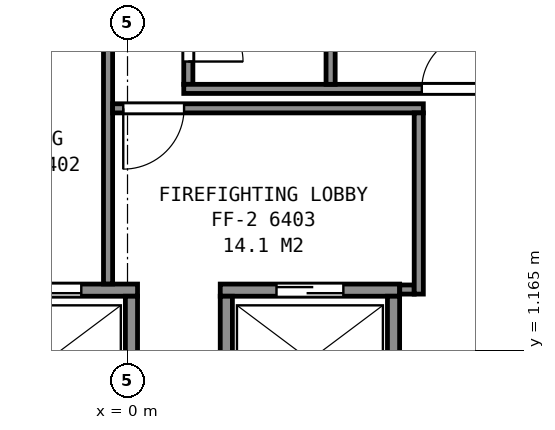
"""IFC4 building model, lengths in metres.
Left out: names, types, materials, properties, quantities, classifications, styles, units other than length and angle.
Written with IfcOpenShell. Run it as: python <this file> out.ifc"""

import sys

from ifc_helpers import new_model, si_unit, direction, frame, frame_2d, origin, place, context, subcontext, project, spatial, rectangle, extrude, element, fill, save


model = new_model("IFC4")
c1 = context("Model", 3, precision=1e-05, world=origin(), true_north=direction((0.0, 1.0)))
c2 = subcontext(c1, "Body", "Model", "MODEL_VIEW")
j1 = project(units=[si_unit("LENGTHUNIT", "METRE"), si_unit("PLANEANGLEUNIT", "RADIAN")], contexts=[c1])
p1 = place(None, origin())
s1 = spatial("IfcSite", under=j1, at=p1, CompositionType="ELEMENT")
p2 = place(p1, origin())
s2 = spatial("IfcBuilding", under=s1, at=p2, CompositionType="ELEMENT")
p3 = place(p2, frame((0.0, 0.0, 254.5)))
s3 = spatial("IfcBuildingStorey", under=s2, at=p3, CompositionType="ELEMENT", Elevation=254.5)
p4 = place(p3, frame((-2.785, 2.15, 0.0), z_axis=(0.0, 0.0, 1.0), x_axis=(1.0, 0.0, 0.0)))
e1 = element("IfcWall", 1, at=p4, inside=s3, PredefinedType="PARTITIONING", context=c2, shape_type="SweptSolid", body=[
    extrude(rectangle(XDim=2.95, YDim=0.2, at=frame_2d((1.475, 0.0))), origin(), (0.0, 0.0, 1.0), 3.7),
])
p5 = place(p4, frame((0.925, 0.0, 0.0)))
e2 = element("IfcOpeningElement", 2, at=p5, cuts=e1, PredefinedType="OPENING", context=c2, shape_type="SweptSolid", body=[
    extrude(rectangle(XDim=1.1, YDim=2.1, at=frame_2d((0.55, 1.05))), frame((0.0, 0.11, 0.0), z_axis=(0.0, -1.0, 0.0), x_axis=(1.0, 0.0, 0.0)), (0.0, 0.0, 1.0), 0.22),
])
p6 = place(p3, frame((1.525, 2.15, 0.0), z_axis=(0.0, 0.0, 1.0), x_axis=(1.0, 0.0, 0.0)))
e3 = element("IfcWall", 3, at=p6, inside=s3, PredefinedType="PARTITIONING", context=c2, shape_type="SweptSolid", body=[
    extrude(rectangle(XDim=2.95, YDim=0.2, at=frame_2d((1.475, 0.0))), origin(), (0.0, 0.0, 1.0), 3.7),
])
p7 = place(p6, frame((0.925, 0.0, 0.0)))
e4 = element("IfcOpeningElement", 4, at=p7, cuts=e3, PredefinedType="OPENING", context=c2, shape_type="SweptSolid", body=[
    extrude(rectangle(XDim=1.1, YDim=2.1, at=frame_2d((0.55, 1.05))), frame((0.0, 0.11, 0.0), z_axis=(0.0, -1.0, 0.0), x_axis=(1.0, 0.0, 0.0)), (0.0, 0.0, 1.0), 0.22),
])
p8 = place(p3, frame((5.663, -1.612, 0.0), z_axis=(0.0, 0.0, 1.0), x_axis=(0.49998122708, 0.866036242063, 0.0)))
e5 = element("IfcWall", 5, at=p8, inside=s3, PredefinedType="PARTITIONING", context=c2, shape_type="SweptSolid", body=[
    extrude(rectangle(XDim=4.9, YDim=0.2, at=frame_2d((2.45, 0.0))), origin(), (0.0, 0.0, 1.0), 3.7),
])
for number, where, z_axis, x_axis in (
    (6, (4.375, 0.1, 0.0), (0.0, 0.0, 1.0), (0.0, 1.0, 0.0)),
    (7, (1.625, 0.1, 0.0), (0.0, 0.0, 1.0), (0.0, 1.0, 0.0)),
    (8, (0.065, 0.1, 0.0), (0.0, 0.0, 1.0), (0.0, 1.0, 0.0)),
):
    element("IfcWall", number, at=place(p3, frame(where, z_axis=z_axis, x_axis=x_axis)), inside=s3, PredefinedType="PARTITIONING", context=c2, shape_type="SweptSolid", body=[
        extrude(rectangle(XDim=1.95, YDim=0.2, at=frame_2d((0.975, 0.0))), origin(), (0.0, 0.0, 1.0), 3.7),
    ])
p9 = place(p3, frame((-0.32, 2.252, 0.0), z_axis=(0.0, 0.0, 1.0), x_axis=(0.0, 1.0, 0.0)))
e9 = element("IfcWall", 9, at=p9, inside=s3, PredefinedType="PARTITIONING", context=c2, shape_type="SweptSolid", body=[
    extrude(rectangle(XDim=4.063, YDim=0.15, at=frame_2d((2.031, 0.0))), origin(), (0.0, 0.0, 1.0), 3.45),
])
p10 = place(p3, frame((-0.245, 5.14, 0.0), z_axis=(0.0, 0.0, 1.0), x_axis=(1.0, 0.0, 0.0)))
e10 = element("IfcWall", 10, at=p10, inside=s3, PredefinedType="PARTITIONING", context=c2, shape_type="SweptSolid", body=[
    extrude(rectangle(XDim=5.11, YDim=0.15, at=frame_2d((2.555, 0.0))), origin(), (0.0, 0.0, 1.0), 3.45),
])
p11 = place(p10, frame((0.175, 0.0, 0.0)))
e11 = element("IfcOpeningElement", 11, at=p11, cuts=e10, PredefinedType="OPENING", context=c2, shape_type="SweptSolid", body=[
    extrude(rectangle(XDim=1.0, YDim=2.1, at=frame_2d((0.5, 1.05))), frame((0.0, 0.085, 0.0), z_axis=(0.0, -1.0, 0.0), x_axis=(1.0, 0.0, 0.0)), (0.0, 0.0, 1.0), 0.17),
])
p12 = place(p3, frame((1.0, 7.56, 0.0), z_axis=(0.0, 0.0, 1.0), x_axis=(0.0, -1.0, 0.0)))
e12 = element("IfcWall", 12, at=p12, inside=s3, PredefinedType="PARTITIONING", context=c2, shape_type="SweptSolid", body=[
    extrude(rectangle(XDim=2.025, YDim=0.15, at=frame_2d((1.013, 0.0))), origin(), (0.0, 0.0, 1.0), 3.45),
])
p13 = place(p12, frame((0.75, 0.0, 0.0)))
e13 = element("IfcOpeningElement", 13, at=p13, cuts=e12, PredefinedType="OPENING", context=c2, shape_type="SweptSolid", body=[
    extrude(rectangle(XDim=0.9, YDim=2.1, at=frame_2d((0.45, 1.05))), frame((0.0, 0.085, 0.0), z_axis=(0.0, -1.0, 0.0), x_axis=(1.0, 0.0, 0.0)), (0.0, 0.0, 1.0), 0.17),
])
p14 = place(p3, frame((0.925, 5.46, 0.0), z_axis=(0.0, 0.0, 1.0), x_axis=(1.0, 0.0, 0.0)))
e14 = element("IfcWall", 14, at=p14, inside=s3, PredefinedType="PARTITIONING", context=c2, shape_type="SweptSolid", body=[
    extrude(rectangle(XDim=5.22, YDim=0.15, at=frame_2d((2.61, 0.0))), origin(), (0.0, 0.0, 1.0), 3.45),
])
p15 = place(p14, frame((3.915, 0.0, 0.0)))
e15 = element("IfcOpeningElement", 15, at=p15, cuts=e14, PredefinedType="OPENING", context=c2, shape_type="SweptSolid", body=[
    extrude(rectangle(XDim=0.9, YDim=2.1, at=frame_2d((0.45, 1.05))), frame((0.0, 0.085, 0.0), z_axis=(0.0, -1.0, 0.0), x_axis=(1.0, 0.0, 0.0)), (0.0, 0.0, 1.0), 0.17),
])
p16 = place(p3, frame((3.34, 5.535, 0.0), z_axis=(0.0, 0.0, 1.0), x_axis=(0.0, 1.0, 0.0)))
e16 = element("IfcWall", 16, at=p16, inside=s3, PredefinedType="PARTITIONING", context=c2, shape_type="SweptSolid", body=[
    extrude(rectangle(XDim=2.025, YDim=0.15, at=frame_2d((1.013, 0.0))), origin(), (0.0, 0.0, 1.0), 3.45),
])
p17 = place(p3, frame((4.477, 2.16, 0.0), z_axis=(0.0, 0.0, 1.0), x_axis=(1.0, 0.0, 0.0)))
e17 = element("IfcWall", 17, at=p17, inside=s3, PredefinedType="PARTITIONING", context=c2, shape_type="SweptSolid", body=[
    extrude(rectangle(XDim=0.238, YDim=0.15, at=frame_2d((0.119, 0.0))), origin(), (0.0, 0.0, 1.0), 3.45),
])
p18 = place(p3, frame((4.79, 2.085, 0.0), z_axis=(0.0, 0.0, 1.0), x_axis=(0.0, 1.0, 0.0)))
e18 = element("IfcWall", 18, at=p18, inside=s3, PredefinedType="PARTITIONING", context=c2, shape_type="SweptSolid", body=[
    extrude(rectangle(XDim=2.98, YDim=0.15, at=frame_2d((1.49, 0.0))), origin(), (0.0, 0.0, 1.0), 3.45),
])
p19 = place(p3, frame((13.342, 2.306, 0.0), z_axis=(0.0, 0.0, 1.0), x_axis=(-0.499983003136, -0.866035216706, 0.0)))
e19 = element("IfcWall", 19, at=p19, inside=s3, PredefinedType="PARTITIONING", context=c2, shape_type="SweptSolid", body=[
    extrude(rectangle(XDim=17.385, YDim=0.2, at=frame_2d((8.692, 0.0))), origin(), (0.0, 0.0, 1.0), 2.362),
])
p20 = place(p19, frame((15.185, 0.0, 0.0)))
e20 = element("IfcOpeningElement", 20, at=p20, cuts=e19, PredefinedType="OPENING", context=c2, shape_type="SweptSolid", body=[
    extrude(rectangle(XDim=0.9, YDim=2.1, at=frame_2d((0.45, 1.05))), frame((0.0, 0.11, 0.0), z_axis=(0.0, -1.0, 0.0), x_axis=(1.0, 0.0, 0.0)), (0.0, 0.0, 1.0), 0.22),
])
p21 = place(p19, frame((12.094, 0.0, 0.0)))
e21 = element("IfcOpeningElement", 21, at=p21, cuts=e19, PredefinedType="OPENING", context=c2, shape_type="SweptSolid", body=[
    extrude(rectangle(XDim=0.9, YDim=2.1, at=frame_2d((0.45, 1.05))), frame((0.0, 0.11, 0.0), z_axis=(0.0, -1.0, 0.0), x_axis=(1.0, 0.0, 0.0)), (0.0, 0.0, 1.0), 0.22),
])
p22 = place(p19, frame((5.867, 0.0, 0.0)))
e22 = element("IfcOpeningElement", 22, at=p22, cuts=e19, PredefinedType="OPENING", context=c2, shape_type="SweptSolid", body=[
    extrude(rectangle(XDim=0.9, YDim=2.1, at=frame_2d((0.45, 1.05))), frame((0.0, 0.11, 0.0), z_axis=(0.0, -1.0, 0.0), x_axis=(1.0, 0.0, 0.0)), (0.0, 0.0, 1.0), 0.22),
])
p23 = place(p19, frame((1.392, 0.0, 0.0)))
e23 = element("IfcOpeningElement", 23, at=p23, cuts=e19, PredefinedType="OPENING", context=c2, shape_type="SweptSolid", body=[
    extrude(rectangle(XDim=0.9, YDim=2.1, at=frame_2d((0.45, 1.05))), frame((0.0, 0.11, 0.0), z_axis=(0.0, -1.0, 0.0), x_axis=(1.0, 0.0, 0.0)), (0.0, 0.0, 1.0), 0.22),
])
p24 = place(p5, origin())
e24 = element("IfcDoor", 24, at=p24, inside=s3, OperationType="SLIDING_TO_LEFT", PredefinedType="DOOR", context=c2, shape_type="SweptSolid", body=[
    extrude(rectangle(XDim=1.1, YDim=2.1, at=frame_2d((0.55, 1.05))), frame((0.0, 0.025, 0.0), z_axis=(0.0, -1.0, 0.0), x_axis=(1.0, 0.0, 0.0)), (0.0, 0.0, 1.0), 0.05),
])
fill(e2, e24)
p25 = place(p7, origin())
e25 = element("IfcDoor", 25, at=p25, inside=s3, OperationType="SLIDING_TO_RIGHT", PredefinedType="DOOR", context=c2, shape_type="SweptSolid", body=[
    extrude(rectangle(XDim=1.1, YDim=2.1, at=frame_2d((0.55, 1.05))), frame((0.0, 0.025, 0.0), z_axis=(0.0, -1.0, 0.0), x_axis=(1.0, 0.0, 0.0)), (0.0, 0.0, 1.0), 0.05),
])
fill(e4, e25)
p26 = place(p11, origin())
e26 = element("IfcDoor", 26, at=p26, inside=s3, OperationType="SINGLE_SWING_LEFT", PredefinedType="DOOR", context=c2, shape_type="SweptSolid", body=[
    extrude(rectangle(XDim=1.0, YDim=2.1, at=frame_2d((0.5, 1.05))), frame((0.0, 0.025, 0.0), z_axis=(0.0, -1.0, 0.0), x_axis=(1.0, 0.0, 0.0)), (0.0, 0.0, 1.0), 0.05),
])
fill(e11, e26)
p27 = place(p13, origin())
e27 = element("IfcDoor", 27, at=p27, inside=s3, OperationType="SINGLE_SWING_RIGHT", PredefinedType="DOOR", context=c2, shape_type="SweptSolid", body=[
    extrude(rectangle(XDim=0.9, YDim=2.1, at=frame_2d((0.45, 1.05))), frame((0.0, 0.025, 0.0), z_axis=(0.0, -1.0, 0.0), x_axis=(1.0, 0.0, 0.0)), (0.0, 0.0, 1.0), 0.05),
])
fill(e13, e27)
p28 = place(p15, origin())
e28 = element("IfcDoor", 28, at=p28, inside=s3, OperationType="SINGLE_SWING_RIGHT", PredefinedType="DOOR", context=c2, shape_type="SweptSolid", body=[
    extrude(rectangle(XDim=0.9, YDim=2.1, at=frame_2d((0.45, 1.05))), frame((0.0, 0.025, 0.0), z_axis=(0.0, -1.0, 0.0), x_axis=(1.0, 0.0, 0.0)), (0.0, 0.0, 1.0), 0.05),
])
fill(e15, e28)
save(model, sys.argv[1])
